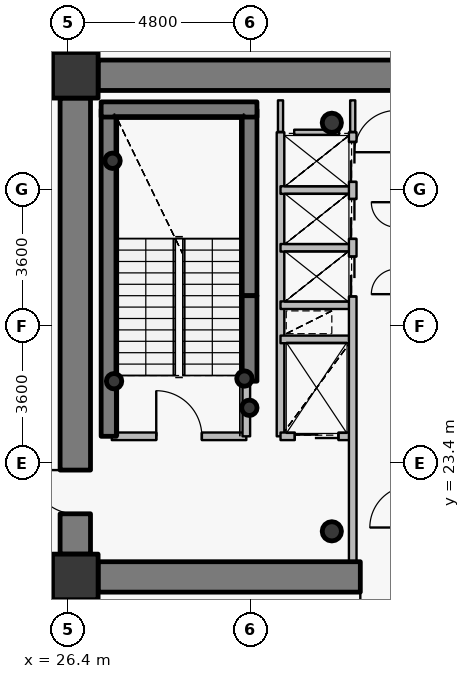
"""IFC4 building model, lengths in metres.
Left out: names, types, materials, properties, quantities, classifications, styles, units other than length and angle.
Written with IfcOpenShell. Run it as: python <this file> out.ifc"""

import sys

from ifc_helpers import new_model, si_unit, direction, frame, frame_2d, origin, origin_2d, place, context, subcontext, project, spatial, rectangle, hollow_circle, extrude, source, transform, mapped, element, fill, save


model = new_model("IFC4")
c1 = context("Model", 3, precision=1e-05, world=origin(), true_north=direction((0.0, 1.0)))
c2 = subcontext(c1, "Body", "Model", "MODEL_VIEW")
j1 = project(units=[si_unit("LENGTHUNIT", "METRE"), si_unit("PLANEANGLEUNIT", "RADIAN")], contexts=[c1])
p1 = place(None, origin())
s1 = spatial("IfcSite", under=j1, at=p1, CompositionType="ELEMENT")
p2 = place(p1, origin())
s2 = spatial("IfcBuilding", under=s1, at=p2, CompositionType="ELEMENT")
p3 = place(p2, frame((0.0, 0.0, 201.15)))
s3 = spatial("IfcBuildingStorey", under=s2, at=p3, CompositionType="ELEMENT", Elevation=201.15)
for number, where, z_axis, x_axis in (
    (1, (26.6, 20.4, 0.0), (0.0, 0.0, 1.0), (1.0, 0.0, 0.0)),
    (2, (26.6, 33.6, 0.0), (0.0, 0.0, 1.0), (1.0, 0.0, 0.0)),
):
    element("IfcColumn", number, at=place(p3, frame(where, z_axis=z_axis, x_axis=x_axis)), inside=s3, PredefinedType="COLUMN", context=c2, shape_type="SweptSolid", body=[
        extrude(rectangle(XDim=1.2, YDim=1.2, at=origin_2d()), origin(), (0.0, 0.0, 1.0), 3.75),
    ])
for number, where, z_axis, x_axis in (
    (3, (33.35, 21.6, 0.0), (0.0, 0.0, 1.0), (1.0, 0.0, 0.0)),
    (4, (33.35, 32.35, 0.0), (0.0, 0.0, 1.0), (1.0, 0.0, 0.0)),
):
    element("IfcColumn", number, at=place(p3, frame(where, z_axis=z_axis, x_axis=x_axis)), inside=s3, PredefinedType="COLUMN", context=c2, shape_type="SweptSolid", body=[
        extrude(hollow_circle(Radius=0.254, WallThickness=0.02, at=origin_2d()), origin(), (0.0, 0.0, 1.0), 3.75),
    ])
p4 = place(p3, frame((27.48, 24.1, 0.0), z_axis=(0.0, 0.0, 1.0), x_axis=(0.0, 1.0, 0.0)))
e5 = element("IfcWall", 5, at=p4, inside=s3, PredefinedType="SHEAR", context=c2, shape_type="SweptSolid", body=[
    extrude(rectangle(XDim=8.6, YDim=0.4, at=frame_2d((4.3, 0.0))), origin(), (0.0, 0.0, 1.0), 3.75),
])
p5 = place(p3, frame((31.18, 27.8, 0.0), z_axis=(0.0, 0.0, 1.0), x_axis=(0.0, 1.0, 0.0)))
e6 = element("IfcWall", 6, at=p5, inside=s3, PredefinedType="SHEAR", context=c2, shape_type="SweptSolid", body=[
    extrude(rectangle(XDim=4.9, YDim=0.4, at=frame_2d((2.45, 0.0))), origin(), (0.0, 0.0, 1.0), 3.75),
])
p6 = place(p3, frame((27.28, 32.7, 0.0), z_axis=(0.0, 0.0, 1.0), x_axis=(1.0, 0.0, 0.0)))
e7 = element("IfcWall", 7, at=p6, inside=s3, PredefinedType="SHEAR", context=c2, shape_type="SweptSolid", body=[
    extrude(rectangle(XDim=4.1, YDim=0.4, at=frame_2d((2.05, 0.0))), origin(), (0.0, 0.0, 1.0), 3.75),
])
for number, where, z_axis, x_axis in (
    (8, (27.58, 31.35, 0.0), (0.0, 0.0, 1.0), (1.0, 0.0, 0.0)),
    (9, (31.05, 25.62, 0.0), (0.0, 0.0, 1.0), (1.0, 0.0, 0.0)),
    (10, (31.18, 24.85, 0.0), (0.0, 0.0, 1.0), (1.0, 0.0, 0.0)),
    (11, (27.62, 25.55, 0.0), (0.0, 0.0, 1.0), (1.0, 0.0, 0.0)),
):
    element("IfcColumn", number, at=place(p3, frame(where, z_axis=z_axis, x_axis=x_axis)), inside=s3, PredefinedType="COLUMN", context=c2, shape_type="SweptSolid", body=[
        extrude(hollow_circle(Radius=0.203, WallThickness=0.016, at=origin_2d()), origin(), (0.0, 0.0, 1.0), 3.75),
    ])
p7 = place(p3, frame((27.2, 33.6, 0.0), z_axis=(0.0, 0.0, 1.0), x_axis=(1.0, 0.0, 0.0)))
e12 = element("IfcWall", 12, at=p7, inside=s3, PredefinedType="SHEAR", context=c2, shape_type="SweptSolid", body=[
    extrude(rectangle(XDim=17.6, YDim=0.8, at=frame_2d((8.8, 0.0))), origin(), (0.0, 0.0, 1.0), 2.9),
])
p8 = place(p7, frame((13.45, 0.0, 0.0)))
e13 = element("IfcOpeningElement", 13, at=p8, cuts=e12, PredefinedType="OPENING", context=c2, shape_type="SweptSolid", body=[
    extrude(rectangle(XDim=1.15, YDim=2.15, at=origin_2d()), frame((0.575, 0.41, 1.075), z_axis=(0.0, -1.0, 0.0), x_axis=(1.0, 0.0, 0.0)), (0.0, 0.0, 1.0), 0.82),
])
p9 = place(p3, frame((44.8, 20.4, 0.0), z_axis=(0.0, 0.0, 1.0), x_axis=(-1.0, 0.0, 0.0)))
e14 = element("IfcWall", 14, at=p9, inside=s3, PredefinedType="SHEAR", context=c2, shape_type="SweptSolid", body=[
    extrude(rectangle(XDim=17.6, YDim=0.8, at=frame_2d((8.8, 0.0))), origin(), (0.0, 0.0, 1.0), 2.9),
])
p10 = place(p9, frame((9.55, 0.0, 0.0)))
e15 = element("IfcOpeningElement", 15, at=p10, cuts=e14, PredefinedType="OPENING", context=c2, shape_type="SweptSolid", body=[
    extrude(rectangle(XDim=1.15, YDim=2.15, at=origin_2d()), frame((0.575, 0.41, 1.075), z_axis=(0.0, -1.0, 0.0), x_axis=(1.0, 0.0, 0.0)), (0.0, 0.0, 1.0), 0.82),
])
p11 = place(p3, frame((26.6, 21.0, 0.0), z_axis=(0.0, 0.0, 1.0), x_axis=(0.0, 1.0, 0.0)))
e16 = element("IfcWall", 16, at=p11, inside=s3, PredefinedType="SHEAR", context=c2, shape_type="SweptSolid", body=[
    extrude(rectangle(XDim=12.0, YDim=0.8, at=frame_2d((6.0, 0.0))), origin(), (0.0, 0.0, 1.0), 2.9),
])
p12 = place(p11, frame((1.061, 0.0, 0.0)))
e17 = element("IfcOpeningElement", 17, at=p12, cuts=e16, PredefinedType="OPENING", context=c2, shape_type="SweptSolid", body=[
    extrude(rectangle(XDim=1.15, YDim=2.15, at=origin_2d()), frame((0.575, 0.41, 1.075), z_axis=(0.0, -1.0, 0.0), x_axis=(1.0, 0.0, 0.0)), (0.0, 0.0, 1.0), 0.82),
])
p13 = place(p3, frame((31.18, 25.55, 0.0), z_axis=(0.0, 0.0, 1.0), x_axis=(0.0, 1.0, 0.0)))
e18 = element("IfcWall", 18, at=p13, inside=s3, PredefinedType="SHEAR", context=c2, shape_type="SweptSolid", body=[
    extrude(rectangle(XDim=2.25, YDim=0.4, at=frame_2d((1.125, 0.0))), origin(), (0.0, 0.0, 1.0), 3.05),
])
p14 = place(p3, frame((27.56, 24.1, 0.0), z_axis=(0.0, 0.0, 1.0), x_axis=(1.0, 0.0, 0.0)))
e19 = element("IfcWall", 19, at=p14, inside=s3, PredefinedType="PARTITIONING", context=c2, shape_type="SweptSolid", body=[
    extrude(rectangle(XDim=3.54, YDim=0.2, at=frame_2d((1.77, 0.0))), origin(), (0.0, 0.0, 1.0), 3.45),
])
p15 = place(p14, frame((1.17, 0.0, 0.0)))
e20 = element("IfcOpeningElement", 20, at=p15, cuts=e19, PredefinedType="OPENING", context=c2, shape_type="SweptSolid", body=[
    extrude(rectangle(XDim=1.2, YDim=2.15, at=origin_2d()), frame((0.6, 0.11, 1.075), z_axis=(0.0, -1.0, 0.0), x_axis=(1.0, 0.0, 0.0)), (0.0, 0.0, 1.0), 0.22),
])
p16 = place(p3, frame((31.1, 24.1, 0.0), z_axis=(0.0, 0.0, 1.0), x_axis=(0.0, 1.0, 0.0)))
e21 = element("IfcWall", 21, at=p16, inside=s3, PredefinedType="PARTITIONING", context=c2, shape_type="SweptSolid", body=[
    extrude(rectangle(XDim=1.44, YDim=0.2, at=frame_2d((0.72, 0.0))), origin(), (0.0, 0.0, 1.0), 3.45),
])
p17 = place(p3, frame((32.0, 24.1, 0.0), z_axis=(0.0, 0.0, 1.0), x_axis=(0.0, 1.0, 0.0)))
e22 = element("IfcWall", 22, at=p17, inside=s3, PredefinedType="PARTITIONING", context=c2, shape_type="SweptSolid", body=[
    extrude(rectangle(XDim=8.0, YDim=0.2, at=frame_2d((4.0, 0.0))), origin(), (0.0, 0.0, 1.0), 3.45),
])
p18 = place(p3, frame((32.0, 24.1, 0.0), z_axis=(0.0, 0.0, 1.0), x_axis=(1.0, 0.0, 0.0)))
e23 = element("IfcWall", 23, at=p18, inside=s3, PredefinedType="PARTITIONING", context=c2, shape_type="SweptSolid", body=[
    extrude(rectangle(XDim=1.9, YDim=0.2, at=frame_2d((0.95, 0.0))), origin(), (0.0, 0.0, 1.0), 3.035),
])
p19 = place(p18, frame((0.375, 0.0, 0.0)))
e24 = element("IfcOpeningElement", 24, at=p19, cuts=e23, PredefinedType="OPENING", context=c2, shape_type="SweptSolid", body=[
    extrude(rectangle(XDim=1.15, YDim=2.15, at=origin_2d()), frame((0.575, 0.11, 1.075), z_axis=(0.0, -1.0, 0.0), x_axis=(1.0, 0.0, 0.0)), (0.0, 0.0, 1.0), 0.22),
])
for number, where, z_axis, x_axis in (
    (25, (32.0, 26.65, 0.0), (0.0, 0.0, 1.0), (1.0, 0.0, 0.0)),
    (26, (32.0, 27.55, 0.0), (0.0, 0.0, 1.0), (1.0, 0.0, 0.0)),
    (27, (32.0, 29.06, 0.0), (0.0, 0.0, 1.0), (1.0, 0.0, 0.0)),
    (28, (32.0, 30.58, 0.0), (0.0, 0.0, 1.0), (1.0, 0.0, 0.0)),
):
    element("IfcWall", number, at=place(p3, frame(where, z_axis=z_axis, x_axis=x_axis)), inside=s3, PredefinedType="PARTITIONING", context=c2, shape_type="SweptSolid", body=[
        extrude(rectangle(XDim=1.9, YDim=0.2, at=frame_2d((0.95, 0.0))), origin(), (0.0, 0.0, 1.0), 3.035),
    ])
p20 = place(p3, frame((33.9, 20.8, 0.0), z_axis=(0.0, 0.0, 1.0), x_axis=(0.0, 1.0, 0.0)))
e29 = element("IfcWall", 29, at=p20, inside=s3, PredefinedType="PARTITIONING", context=c2, shape_type="SweptSolid", body=[
    extrude(rectangle(XDim=11.3, YDim=0.2, at=frame_2d((5.65, 0.0))), origin(), (0.0, 0.0, 1.0), 3.035),
])
p21 = place(p20, frame((6.98, 0.0, 0.0)))
e30 = element("IfcOpeningElement", 30, at=p21, cuts=e29, PredefinedType="OPENING", context=c2, shape_type="SweptSolid", body=[
    extrude(rectangle(XDim=1.05, YDim=2.15, at=origin_2d()), frame((0.525, 0.11, 1.075), z_axis=(0.0, -1.0, 0.0), x_axis=(1.0, 0.0, 0.0)), (0.0, 0.0, 1.0), 0.22),
])
p22 = place(p20, frame((8.495, 0.0, 0.0)))
e31 = element("IfcOpeningElement", 31, at=p22, cuts=e29, PredefinedType="OPENING", context=c2, shape_type="SweptSolid", body=[
    extrude(rectangle(XDim=1.05, YDim=2.15, at=origin_2d()), frame((0.525, 0.11, 1.075), z_axis=(0.0, -1.0, 0.0), x_axis=(1.0, 0.0, 0.0)), (0.0, 0.0, 1.0), 0.22),
])
p23 = place(p20, frame((9.995, 0.0, 0.0)))
e32 = element("IfcOpeningElement", 32, at=p23, cuts=e29, PredefinedType="OPENING", context=c2, shape_type="SweptSolid", body=[
    extrude(rectangle(XDim=1.05, YDim=2.15, at=origin_2d()), frame((0.525, 0.11, 1.075), z_axis=(0.0, -1.0, 0.0), x_axis=(1.0, 0.0, 0.0)), (0.0, 0.0, 1.0), 0.22),
])
p24 = place(p3, frame((32.36, 32.1, 0.0), z_axis=(0.0, 0.0, 1.0), x_axis=(1.0, 0.0, 0.0)))
e33 = element("IfcWall", 33, at=p24, inside=s3, PredefinedType="PARTITIONING", context=c2, shape_type="SweptSolid", body=[
    extrude(rectangle(XDim=1.18, YDim=0.135, at=frame_2d((0.59, 0.0))), origin(), (0.0, 0.0, 1.0), 3.035),
])
p25 = place(p3, frame((32.0, 32.94, 0.0), z_axis=(0.0, 0.0, 1.0), x_axis=(0.0, -1.0, 0.0)))
e34 = element("IfcWall", 34, at=p25, inside=s3, PredefinedType="PARTITIONING", context=c2, shape_type="SweptSolid", body=[
    extrude(rectangle(XDim=0.83, YDim=0.135, at=frame_2d((0.415, 0.0))), origin(), (0.0, 0.0, 1.0), 2.985),
])
p26 = place(p3, frame((33.9, 32.11, 0.0), z_axis=(0.0, 0.0, 1.0), x_axis=(0.0, 1.0, 0.0)))
e35 = element("IfcWall", 35, at=p26, inside=s3, PredefinedType="PARTITIONING", context=c2, shape_type="SweptSolid", body=[
    extrude(rectangle(XDim=0.83, YDim=0.135, at=frame_2d((0.415, 0.0))), origin(), (0.0, 0.0, 1.0), 3.035),
])
p27 = place(p3, frame((27.19, 34.0, 0.0), z_axis=(0.0, 0.0, 1.0), x_axis=(-1.0, 0.0, 0.0)))
e36 = element("IfcWall", 36, at=p27, inside=s3, PredefinedType="PARTITIONING", context=c2, shape_type="SweptSolid", body=[
    extrude(rectangle(XDim=0.99, YDim=0.135, at=frame_2d((0.495, 0.0))), origin(), (0.0, 0.0, 1.0), 2.885),
])
p28 = place(p3, frame((26.2, 33.692, 0.0), z_axis=(0.0, 0.0, 1.0), x_axis=(0.0, -1.0, 0.0)))
e37 = element("IfcWall", 37, at=p28, inside=s3, PredefinedType="PARTITIONING", context=c2, shape_type="SweptSolid", body=[
    extrude(rectangle(XDim=0.682, YDim=0.135, at=frame_2d((0.341, 0.0))), origin(), (0.0, 0.0, 1.0), 3.45),
])
p29 = place(p3, frame((26.2, 20.99, 0.0), z_axis=(0.0, 0.0, 1.0), x_axis=(0.0, -1.0, 0.0)))
e38 = element("IfcWall", 38, at=p29, inside=s3, PredefinedType="PARTITIONING", context=c2, shape_type="SweptSolid", body=[
    extrude(rectangle(XDim=0.99, YDim=0.135, at=frame_2d((0.495, 0.0))), origin(), (0.0, 0.0, 1.0), 3.45),
])
p30 = place(p3, frame((26.508, 20.0, 0.0), z_axis=(0.0, 0.0, 1.0), x_axis=(1.0, 0.0, 0.0)))
e39 = element("IfcWall", 39, at=p30, inside=s3, PredefinedType="PARTITIONING", context=c2, shape_type="SweptSolid", body=[
    extrude(rectangle(XDim=0.682, YDim=0.135, at=frame_2d((0.341, 0.0))), origin(), (0.0, 0.0, 1.0), 2.885),
])
m1 = source(origin(), c2, "Body", "SweptSolid", [
    extrude(rectangle(XDim=1.15, YDim=2.15, at=origin_2d()), frame((0.575, 0.025, 1.075), z_axis=(0.0, -1.0, 0.0), x_axis=(1.0, 0.0, 0.0)), (0.0, 0.0, 1.0), 0.05),
])
p31 = place(p12, origin())
e40 = element("IfcDoor", 40, at=p31, inside=s3, OperationType="SINGLE_SWING_RIGHT", PredefinedType="DOOR", context=c2, shape_type="MappedRepresentation", body=[
    mapped(m1, transform((0.0, 0.0, 0.0), x_axis=(1.0, 0.0, 0.0), y_axis=(0.0, 1.0, 0.0), z_axis=(0.0, 0.0, 1.0), scale=1.0)),
])
fill(e17, e40)
p32 = place(p10, origin())
e41 = element("IfcDoor", 41, at=p32, inside=s3, OperationType="SINGLE_SWING_RIGHT", PredefinedType="DOOR", context=c2, shape_type="MappedRepresentation", body=[
    mapped(m1, transform((0.0, 0.0, 0.0), x_axis=(1.0, 0.0, 0.0), y_axis=(0.0, 1.0, 0.0), z_axis=(0.0, 0.0, 1.0), scale=1.0)),
])
fill(e15, e41)
m2 = source(origin(), c2, "Body", "SweptSolid", [
    extrude(rectangle(XDim=1.2, YDim=2.15, at=origin_2d()), frame((0.6, 0.025, 1.075), z_axis=(0.0, -1.0, 0.0), x_axis=(1.0, 0.0, 0.0)), (0.0, 0.0, 1.0), 0.05),
])
p33 = place(p15, origin())
e42 = element("IfcDoor", 42, at=p33, inside=s3, OperationType="SINGLE_SWING_LEFT", PredefinedType="DOOR", context=c2, shape_type="MappedRepresentation", body=[
    mapped(m2, transform((0.0, 0.0, 0.0), x_axis=(1.0, 0.0, 0.0), y_axis=(0.0, 1.0, 0.0), z_axis=(0.0, 0.0, 1.0), scale=1.0)),
])
fill(e20, e42)
m3 = source(origin(), c2, "Body", "SweptSolid", [
    extrude(rectangle(XDim=1.15, YDim=2.15, at=origin_2d()), frame((0.575, 0.025, 1.075), z_axis=(0.0, -1.0, 0.0), x_axis=(1.0, 0.0, 0.0)), (0.0, 0.0, 1.0), 0.05),
])
p34 = place(p19, origin())
e43 = element("IfcDoor", 43, at=p34, inside=s3, OperationType="DOUBLE_DOOR_SLIDING", PredefinedType="USERDEFINED", context=c2, shape_type="MappedRepresentation", body=[
    mapped(m3, transform((0.0, 0.0, 0.0), x_axis=(1.0, 0.0, 0.0), y_axis=(0.0, 1.0, 0.0), z_axis=(0.0, 0.0, 1.0), scale=1.0)),
])
fill(e24, e43)
m4 = source(origin(), c2, "Body", "SweptSolid", [
    extrude(rectangle(XDim=1.05, YDim=2.15, at=origin_2d()), frame((0.525, 0.025, 1.075), z_axis=(0.0, -1.0, 0.0), x_axis=(1.0, 0.0, 0.0)), (0.0, 0.0, 1.0), 0.05),
])
p35 = place(p21, origin())
e44 = element("IfcDoor", 44, at=p35, inside=s3, OperationType="DOUBLE_DOOR_SLIDING", PredefinedType="USERDEFINED", context=c2, shape_type="MappedRepresentation", body=[
    mapped(m4, transform((0.0, 0.0, 0.0), x_axis=(1.0, 0.0, 0.0), y_axis=(0.0, 1.0, 0.0), z_axis=(0.0, 0.0, 1.0), scale=1.0)),
])
fill(e30, e44)
p36 = place(p22, origin())
e45 = element("IfcDoor", 45, at=p36, inside=s3, OperationType="DOUBLE_DOOR_SLIDING", PredefinedType="USERDEFINED", context=c2, shape_type="MappedRepresentation", body=[
    mapped(m4, transform((0.0, 0.0, 0.0), x_axis=(1.0, 0.0, 0.0), y_axis=(0.0, 1.0, 0.0), z_axis=(0.0, 0.0, 1.0), scale=1.0)),
])
fill(e31, e45)
p37 = place(p23, origin())
e46 = element("IfcDoor", 46, at=p37, inside=s3, OperationType="DOUBLE_DOOR_SLIDING", PredefinedType="USERDEFINED", context=c2, shape_type="MappedRepresentation", body=[
    mapped(m4, transform((0.0, 0.0, 0.0), x_axis=(1.0, 0.0, 0.0), y_axis=(0.0, 1.0, 0.0), z_axis=(0.0, 0.0, 1.0), scale=1.0)),
])
fill(e32, e46)
save(model, sys.argv[1])
